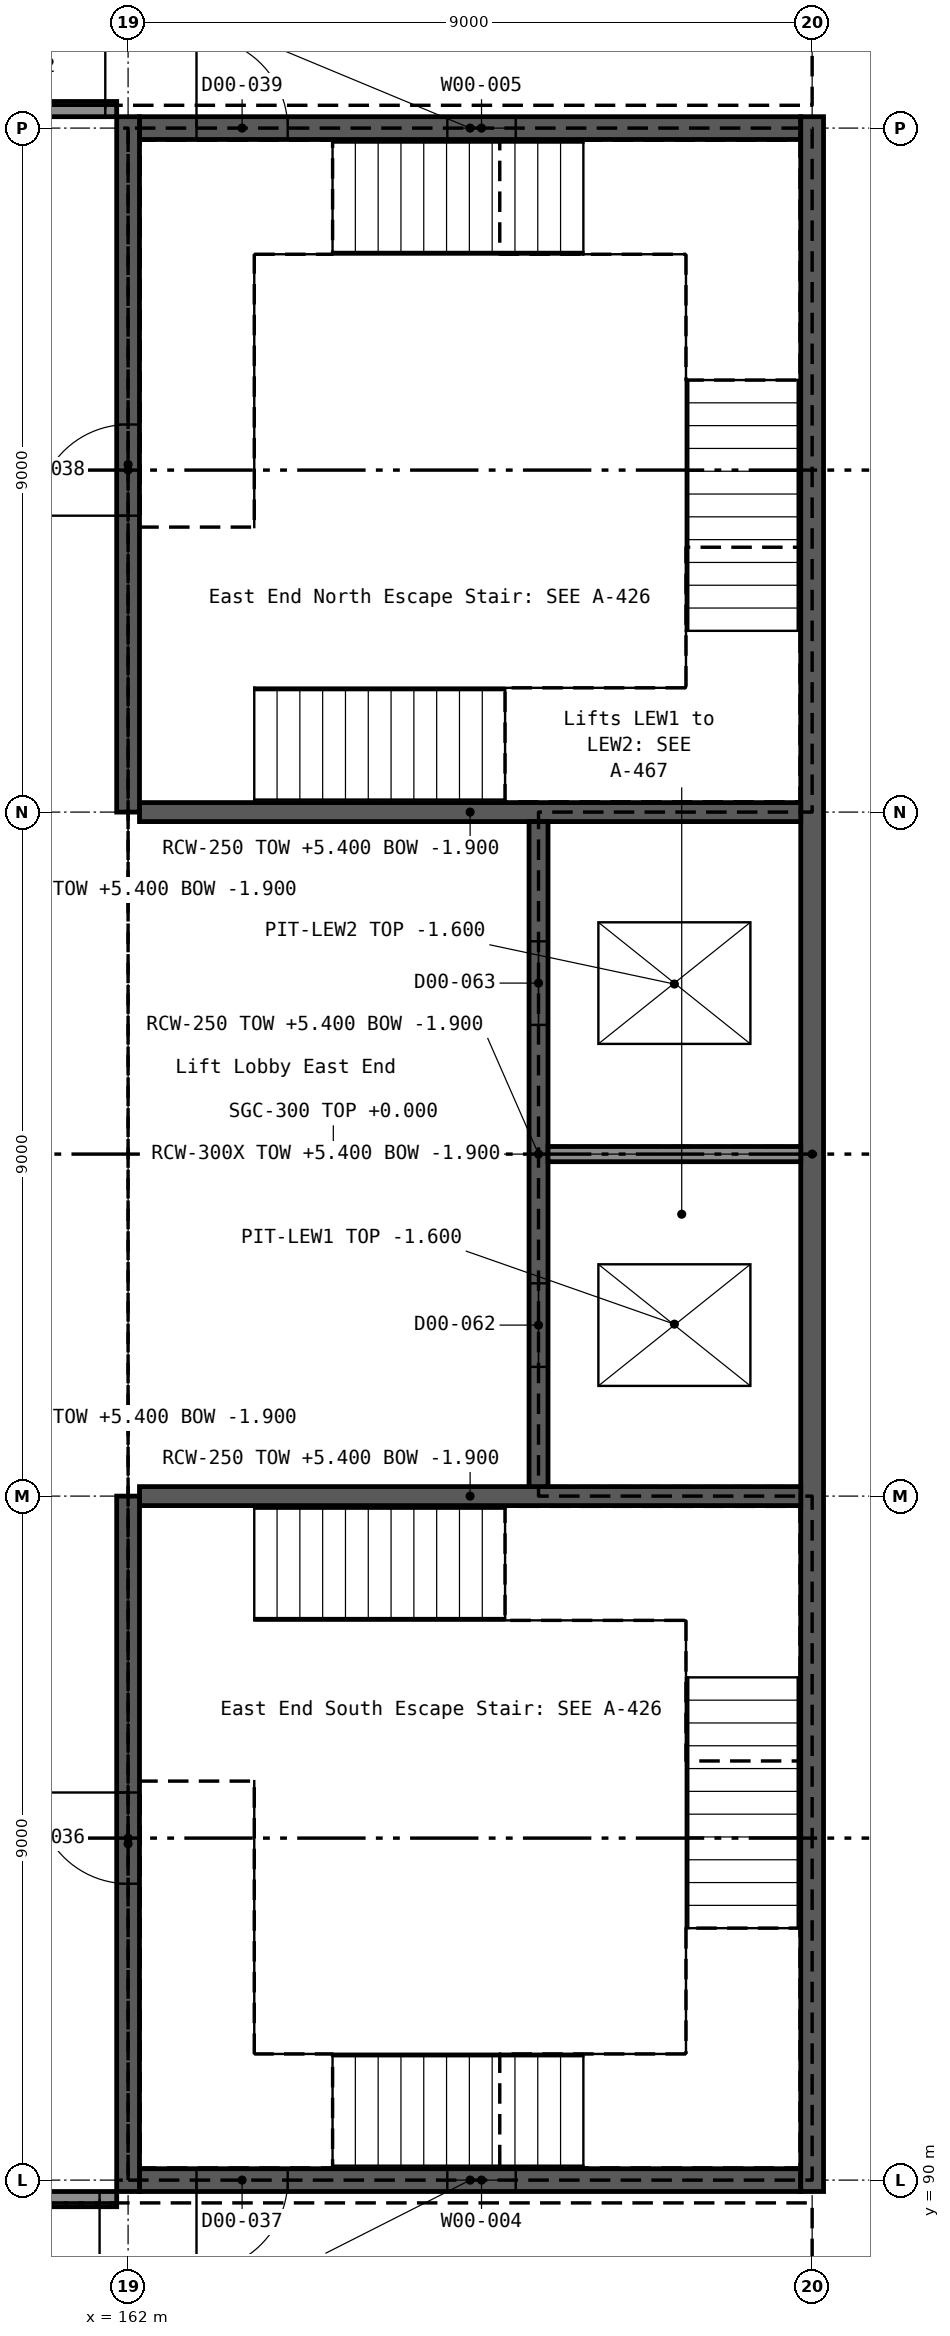
"""IFC4 building model, lengths in metres.
Left out: names, types, materials, properties, quantities, classifications, styles, units other than length and angle.
Written with IfcOpenShell. Run it as: python <this file> out.ifc"""

import sys

from ifc_helpers import new_model, si_unit, direction, frame, frame_2d, origin, place, context, subcontext, project, spatial, rectangle, extrude, element, fill, save


model = new_model("IFC4")
c1 = context("Model", 3, precision=1e-05, world=origin(), true_north=direction((0.0, 1.0)))
c2 = subcontext(c1, "Body", "Model", "MODEL_VIEW")
j1 = project(units=[si_unit("LENGTHUNIT", "METRE"), si_unit("PLANEANGLEUNIT", "RADIAN")], contexts=[c1])
p1 = place(None, origin())
s1 = spatial("IfcSite", under=j1, at=p1, CompositionType="ELEMENT")
p2 = place(p1, origin())
s2 = spatial("IfcBuilding", under=s1, at=p2, CompositionType="ELEMENT")
p3 = place(p2, origin())
s3 = spatial("IfcBuildingStorey", under=s2, at=p3, CompositionType="ELEMENT", Elevation=0.0)
p4 = place(p3, frame((162.15, 90.0, -1.9), z_axis=(0.0, 0.0, 1.0), x_axis=(1.0, 0.0, 0.0)))
e1 = element("IfcWall", 1, at=p4, inside=s3, PredefinedType="SHEAR", context=c2, shape_type="SweptSolid", body=[
    extrude(rectangle(XDim=8.7, YDim=0.3, at=frame_2d((4.35, 0.0))), origin(), (0.0, 0.0, 1.0), 7.3),
])
p5 = place(p4, frame((4.05, 0.0, 3.4)))
e2 = element("IfcOpeningElement", 2, at=p5, cuts=e1, PredefinedType="OPENING", context=c2, shape_type="SweptSolid", body=[
    extrude(rectangle(XDim=0.9, YDim=1.2, at=frame_2d((0.45, 0.6))), frame((0.0, 0.161, 0.0), z_axis=(0.0, -1.0, 0.0), x_axis=(1.0, 0.0, 0.0)), (0.0, 0.0, 1.0), 0.322),
])
p6 = place(p4, frame((0.75, 0.0, 1.9)))
e3 = element("IfcOpeningElement", 3, at=p6, cuts=e1, PredefinedType="OPENING", context=c2, shape_type="SweptSolid", body=[
    extrude(rectangle(XDim=1.2, YDim=2.1, at=frame_2d((0.6, 1.05))), frame((0.0, 0.161, 0.0), z_axis=(0.0, -1.0, 0.0), x_axis=(1.0, 0.0, 0.0)), (0.0, 0.0, 1.0), 0.322),
])
p7 = place(p3, frame((162.15, 117.0, -1.9), z_axis=(0.0, 0.0, 1.0), x_axis=(1.0, 0.0, 0.0)))
e4 = element("IfcWall", 4, at=p7, inside=s3, PredefinedType="SHEAR", context=c2, shape_type="SweptSolid", body=[
    extrude(rectangle(XDim=8.7, YDim=0.3, at=frame_2d((4.35, 0.0))), origin(), (0.0, 0.0, 1.0), 7.3),
])
p8 = place(p7, frame((4.05, 0.0, 3.4)))
e5 = element("IfcOpeningElement", 5, at=p8, cuts=e4, PredefinedType="OPENING", context=c2, shape_type="SweptSolid", body=[
    extrude(rectangle(XDim=0.9, YDim=1.2, at=frame_2d((0.45, 0.6))), frame((0.0, 0.161, 0.0), z_axis=(0.0, -1.0, 0.0), x_axis=(1.0, 0.0, 0.0)), (0.0, 0.0, 1.0), 0.322),
])
p9 = place(p7, frame((0.75, 0.0, 1.9)))
e6 = element("IfcOpeningElement", 6, at=p9, cuts=e4, PredefinedType="OPENING", context=c2, shape_type="SweptSolid", body=[
    extrude(rectangle(XDim=1.2, YDim=2.1, at=frame_2d((0.6, 1.05))), frame((0.0, 0.161, 0.0), z_axis=(0.0, -1.0, 0.0), x_axis=(1.0, 0.0, 0.0)), (0.0, 0.0, 1.0), 0.322),
])
p10 = place(p3, frame((171.0, 89.85, -1.9), z_axis=(0.0, 0.0, 1.0), x_axis=(0.0, 1.0, 0.0)))
e7 = element("IfcWall", 7, at=p10, inside=s3, PredefinedType="SHEAR", context=c2, shape_type="SweptSolid", body=[
    extrude(rectangle(XDim=27.3, YDim=0.3, at=frame_2d((13.65, 0.0))), origin(), (0.0, 0.0, 1.0), 7.3),
])
for number, where, z_axis, x_axis in (
    (8, (162.15, 99.0, -1.9), (0.0, 0.0, 1.0), (1.0, 0.0, 0.0)),
    (9, (162.15, 108.0, -1.9), (0.0, 0.0, 1.0), (1.0, 0.0, 0.0)),
):
    element("IfcWall", number, at=place(p3, frame(where, z_axis=z_axis, x_axis=x_axis)), inside=s3, PredefinedType="SHEAR", context=c2, shape_type="SweptSolid", body=[
        extrude(rectangle(XDim=8.7, YDim=0.25, at=frame_2d((4.35, 0.0))), origin(), (0.0, 0.0, 1.0), 7.3),
    ])
p11 = place(p3, frame((167.4, 99.125, -1.9), z_axis=(0.0, 0.0, 1.0), x_axis=(0.0, 1.0, 0.0)))
e10 = element("IfcWall", 10, at=p11, inside=s3, PredefinedType="SHEAR", context=c2, shape_type="SweptSolid", body=[
    extrude(rectangle(XDim=8.75, YDim=0.25, at=frame_2d((4.375, 0.0))), origin(), (0.0, 0.0, 1.0), 7.3),
])
p12 = place(p11, frame((1.575, 0.0, 1.9)))
e11 = element("IfcOpeningElement", 11, at=p12, cuts=e10, PredefinedType="OPENING", context=c2, shape_type="SweptSolid", body=[
    extrude(rectangle(XDim=1.1, YDim=2.1, at=frame_2d((0.55, 1.05))), frame((0.0, 0.136, 0.0), z_axis=(0.0, -1.0, 0.0), x_axis=(1.0, 0.0, 0.0)), (0.0, 0.0, 1.0), 0.272),
])
p13 = place(p11, frame((6.075, 0.0, 1.9)))
e12 = element("IfcOpeningElement", 12, at=p13, cuts=e10, PredefinedType="OPENING", context=c2, shape_type="SweptSolid", body=[
    extrude(rectangle(XDim=1.1, YDim=2.1, at=frame_2d((0.55, 1.05))), frame((0.0, 0.136, 0.0), z_axis=(0.0, -1.0, 0.0), x_axis=(1.0, 0.0, 0.0)), (0.0, 0.0, 1.0), 0.272),
])
p14 = place(p3, frame((162.0, 89.85, -1.9), z_axis=(0.0, 0.0, 1.0), x_axis=(0.0, 1.0, 0.0)))
e13 = element("IfcWall", 13, at=p14, inside=s3, PredefinedType="SHEAR", context=c2, shape_type="SweptSolid", body=[
    extrude(rectangle(XDim=9.15, YDim=0.3, at=frame_2d((4.575, 0.0))), origin(), (0.0, 0.0, 1.0), 7.3),
])
p15 = place(p14, frame((4.05, 0.0, 1.9)))
e14 = element("IfcOpeningElement", 14, at=p15, cuts=e13, PredefinedType="OPENING", context=c2, shape_type="SweptSolid", body=[
    extrude(rectangle(XDim=1.2, YDim=2.1, at=frame_2d((0.6, 1.05))), frame((0.0, 0.161, 0.0), z_axis=(0.0, -1.0, 0.0), x_axis=(1.0, 0.0, 0.0)), (0.0, 0.0, 1.0), 0.322),
])
p16 = place(p3, frame((162.0, 108.0, -1.9), z_axis=(0.0, 0.0, 1.0), x_axis=(0.0, 1.0, 0.0)))
e15 = element("IfcWall", 15, at=p16, inside=s3, PredefinedType="SHEAR", context=c2, shape_type="SweptSolid", body=[
    extrude(rectangle(XDim=9.15, YDim=0.3, at=frame_2d((4.575, 0.0))), origin(), (0.0, 0.0, 1.0), 7.3),
])
p17 = place(p16, frame((3.9, 0.0, 1.9)))
e16 = element("IfcOpeningElement", 16, at=p17, cuts=e15, PredefinedType="OPENING", context=c2, shape_type="SweptSolid", body=[
    extrude(rectangle(XDim=1.2, YDim=2.1, at=frame_2d((0.6, 1.05))), frame((0.0, 0.161, 0.0), z_axis=(0.0, -1.0, 0.0), x_axis=(1.0, 0.0, 0.0)), (0.0, 0.0, 1.0), 0.322),
])
p18 = place(p3, frame((159.0, 89.75, 0.0), z_axis=(0.0, 0.0, 1.0), x_axis=(1.0, 0.0, 0.0)))
e17 = element("IfcWall", 17, at=p18, inside=s3, PredefinedType="SOLIDWALL", context=c2, shape_type="SweptSolid", body=[
    extrude(rectangle(XDim=2.85, YDim=0.2, at=frame_2d((1.425, 0.0))), origin(), (0.0, 0.0, 1.0), 5.4),
])
p19 = place(p18, frame((0.225, 0.0, 0.0)))
e18 = element("IfcOpeningElement", 18, at=p19, cuts=e17, PredefinedType="OPENING", context=c2, shape_type="SweptSolid", body=[
    extrude(rectangle(XDim=2.4, YDim=2.4, at=frame_2d((1.2, 1.2))), frame((0.0, 0.111, 0.0), z_axis=(0.0, -1.0, 0.0), x_axis=(1.0, 0.0, 0.0)), (0.0, 0.0, 1.0), 0.222),
])
p20 = place(p3, frame((161.85, 117.25, 0.0), z_axis=(0.0, 0.0, 1.0), x_axis=(-1.0, 0.0, 0.0)))
e19 = element("IfcWall", 19, at=p20, inside=s3, PredefinedType="SOLIDWALL", context=c2, shape_type="SweptSolid", body=[
    extrude(rectangle(XDim=5.85, YDim=0.2, at=frame_2d((2.925, 0.0))), origin(), (0.0, 0.0, 1.0), 5.4),
])
p21 = place(p20, frame((0.15, 0.0, 0.0)))
e20 = element("IfcOpeningElement", 20, at=p21, cuts=e19, PredefinedType="OPENING", context=c2, shape_type="SweptSolid", body=[
    extrude(rectangle(XDim=2.4, YDim=2.4, at=frame_2d((1.2, 1.2))), frame((0.0, 0.111, 0.0), z_axis=(0.0, -1.0, 0.0), x_axis=(1.0, 0.0, 0.0)), (0.0, 0.0, 1.0), 0.222),
])
p22 = place(p3, frame((167.525, 103.5, -1.9), z_axis=(0.0, 0.0, 1.0), x_axis=(1.0, 0.0, 0.0)))
e21 = element("IfcWall", 21, at=p22, inside=s3, PredefinedType="SOLIDWALL", context=c2, shape_type="SweptSolid", body=[
    extrude(rectangle(XDim=3.325, YDim=0.2, at=frame_2d((1.663, 0.0))), origin(), (0.0, 0.0, 1.0), 7.3),
])
p23 = place(p19, frame((2.4, 0.0, 0.0), z_axis=(0.0, 0.0, 1.0), x_axis=(-1.0, 0.0, 0.0)))
e22 = element("IfcDoor", 22, at=p23, inside=s3, OperationType="DOUBLE_DOOR_DOUBLE_SWING", PredefinedType="DOOR", context=c2, shape_type="SweptSolid", body=[
    extrude(rectangle(XDim=2.4, YDim=2.4, at=frame_2d((1.2, 1.2))), frame((0.0, 0.025, 0.0), z_axis=(0.0, -1.0, 0.0), x_axis=(1.0, 0.0, 0.0)), (0.0, 0.0, 1.0), 0.05),
])
fill(e18, e22)
p24 = place(p5, origin())
e23 = element("IfcWindow", 23, at=p24, inside=s3, PartitioningType="SINGLE_PANEL", PredefinedType="WINDOW", context=c2, shape_type="SweptSolid", body=[
    extrude(rectangle(XDim=0.9, YDim=1.2, at=frame_2d((0.45, 0.6))), frame((0.0, 0.03, 0.0), z_axis=(0.0, -1.0, 0.0), x_axis=(1.0, 0.0, 0.0)), (0.0, 0.0, 1.0), 0.06),
])
fill(e2, e23)
p25 = place(p8, origin())
e24 = element("IfcWindow", 24, at=p25, inside=s3, PartitioningType="SINGLE_PANEL", PredefinedType="WINDOW", context=c2, shape_type="SweptSolid", body=[
    extrude(rectangle(XDim=0.9, YDim=1.2, at=frame_2d((0.45, 0.6))), frame((0.0, 0.03, 0.0), z_axis=(0.0, -1.0, 0.0), x_axis=(1.0, 0.0, 0.0)), (0.0, 0.0, 1.0), 0.06),
])
fill(e5, e24)
p26 = place(p21, frame((2.4, 0.0, 0.0), z_axis=(0.0, 0.0, 1.0), x_axis=(-1.0, 0.0, 0.0)))
e25 = element("IfcDoor", 25, at=p26, inside=s3, OperationType="DOUBLE_DOOR_DOUBLE_SWING", PredefinedType="DOOR", context=c2, shape_type="SweptSolid", body=[
    extrude(rectangle(XDim=2.4, YDim=2.4, at=frame_2d((1.2, 1.2))), frame((0.0, 0.025, 0.0), z_axis=(0.0, -1.0, 0.0), x_axis=(1.0, 0.0, 0.0)), (0.0, 0.0, 1.0), 0.05),
])
fill(e20, e25)
p27 = place(p15, origin())
e26 = element("IfcDoor", 26, at=p27, inside=s3, OperationType="SINGLE_SWING_RIGHT", PredefinedType="DOOR", context=c2, shape_type="SweptSolid", body=[
    extrude(rectangle(XDim=1.2, YDim=2.1, at=frame_2d((0.6, 1.05))), frame((0.0, 0.025, 0.0), z_axis=(0.0, -1.0, 0.0), x_axis=(1.0, 0.0, 0.0)), (0.0, 0.0, 1.0), 0.05),
])
fill(e14, e26)
p28 = place(p6, frame((1.2, 0.0, 0.0), z_axis=(0.0, 0.0, 1.0), x_axis=(-1.0, 0.0, 0.0)))
e27 = element("IfcDoor", 27, at=p28, inside=s3, OperationType="SINGLE_SWING_RIGHT", PredefinedType="DOOR", context=c2, shape_type="SweptSolid", body=[
    extrude(rectangle(XDim=1.2, YDim=2.1, at=frame_2d((0.6, 1.05))), frame((0.0, 0.025, 0.0), z_axis=(0.0, -1.0, 0.0), x_axis=(1.0, 0.0, 0.0)), (0.0, 0.0, 1.0), 0.05),
])
fill(e3, e27)
p29 = place(p17, origin())
e28 = element("IfcDoor", 28, at=p29, inside=s3, OperationType="SINGLE_SWING_LEFT", PredefinedType="DOOR", context=c2, shape_type="SweptSolid", body=[
    extrude(rectangle(XDim=1.2, YDim=2.1, at=frame_2d((0.6, 1.05))), frame((0.0, 0.025, 0.0), z_axis=(0.0, -1.0, 0.0), x_axis=(1.0, 0.0, 0.0)), (0.0, 0.0, 1.0), 0.05),
])
fill(e16, e28)
p30 = place(p9, origin())
e29 = element("IfcDoor", 29, at=p30, inside=s3, OperationType="SINGLE_SWING_LEFT", PredefinedType="DOOR", context=c2, shape_type="SweptSolid", body=[
    extrude(rectangle(XDim=1.2, YDim=2.1, at=frame_2d((0.6, 1.05))), frame((0.0, 0.025, 0.0), z_axis=(0.0, -1.0, 0.0), x_axis=(1.0, 0.0, 0.0)), (0.0, 0.0, 1.0), 0.05),
])
fill(e6, e29)
p31 = place(p12, origin())
e30 = element("IfcDoor", 30, at=p31, inside=s3, OperationType="DOUBLE_DOOR_SLIDING", PredefinedType="DOOR", context=c2, shape_type="SweptSolid", body=[
    extrude(rectangle(XDim=1.1, YDim=2.1, at=frame_2d((0.55, 1.05))), frame((0.0, 0.025, 0.0), z_axis=(0.0, -1.0, 0.0), x_axis=(1.0, 0.0, 0.0)), (0.0, 0.0, 1.0), 0.05),
])
fill(e11, e30)
p32 = place(p13, origin())
e31 = element("IfcDoor", 31, at=p32, inside=s3, OperationType="DOUBLE_DOOR_SLIDING", PredefinedType="DOOR", context=c2, shape_type="SweptSolid", body=[
    extrude(rectangle(XDim=1.1, YDim=2.1, at=frame_2d((0.55, 1.05))), frame((0.0, 0.025, 0.0), z_axis=(0.0, -1.0, 0.0), x_axis=(1.0, 0.0, 0.0)), (0.0, 0.0, 1.0), 0.05),
])
fill(e12, e31)
save(model, sys.argv[1])
